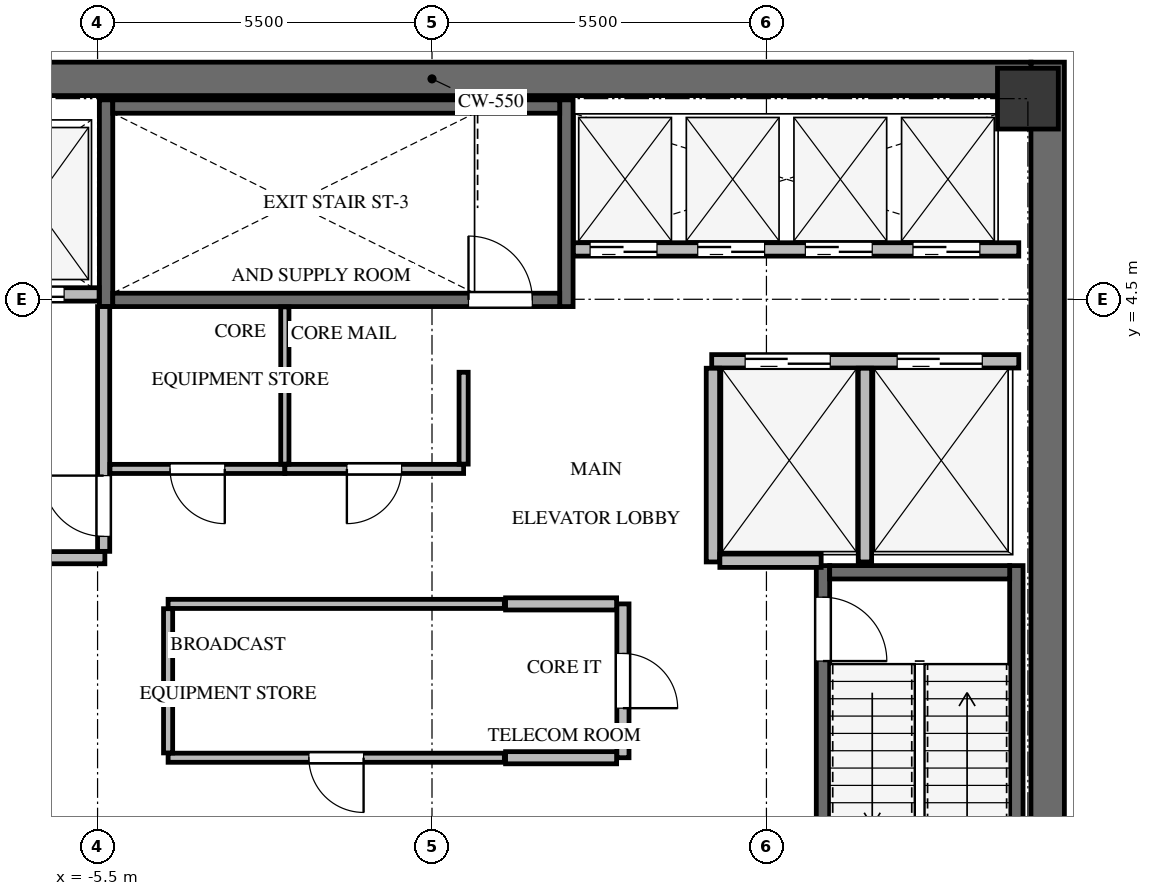
"""IFC4 building model, lengths in metres.
Left out: names, types, materials, properties, quantities, classifications, styles, units other than length and angle.
Written with IfcOpenShell. Run it as: python <this file> out.ifc"""

import sys

from ifc_helpers import new_model, si_unit, direction, frame, frame_2d, origin, origin_2d, place, context, subcontext, project, spatial, rectangle, extrude, source, transform, mapped, element, fill, save


model = new_model("IFC4")
c1 = context("Model", 3, precision=1e-05, world=origin(), true_north=direction((0.0, 1.0)))
c2 = subcontext(c1, "Body", "Model", "MODEL_VIEW")
j1 = project(units=[si_unit("LENGTHUNIT", "METRE"), si_unit("PLANEANGLEUNIT", "RADIAN")], contexts=[c1])
p1 = place(None, origin())
s1 = spatial("IfcSite", under=j1, at=p1, CompositionType="ELEMENT")
p2 = place(p1, origin())
s2 = spatial("IfcBuilding", under=s1, at=p2, CompositionType="ELEMENT")
p3 = place(p2, frame((0.0, 0.0, 268.3)))
s3 = spatial("IfcBuildingStorey", under=s2, at=p3, CompositionType="ELEMENT", Elevation=268.3)
p4 = place(p3, frame((10.125, -8.4, 0.0), z_axis=(0.0, 0.0, 1.0), x_axis=(0.0, 1.0, 0.0)))
e1 = element("IfcWall", 1, at=p4, inside=s3, PredefinedType="SHEAR", context=c2, shape_type="SweptSolid", body=[
    extrude(rectangle(XDim=16.8, YDim=0.55, at=frame_2d((8.4, 0.0))), origin(), (0.0, 0.0, 1.0), 4.2),
])
p5 = place(p3, frame((-9.85, 8.125, 0.0), z_axis=(0.0, 0.0, 1.0), x_axis=(1.0, 0.0, 0.0)))
e2 = element("IfcWall", 2, at=p5, inside=s3, PredefinedType="SHEAR", context=c2, shape_type="SweptSolid", body=[
    extrude(rectangle(XDim=19.7, YDim=0.55, at=frame_2d((9.85, 0.0))), origin(), (0.0, 0.0, 1.0), 4.2),
])
p6 = place(p3, frame((9.61, -7.77, -0.3), z_axis=(0.0, 0.0, 1.0), x_axis=(0.0, 1.0, 0.0)))
e3 = element("IfcWall", 3, at=p6, inside=s3, PredefinedType="SHEAR", context=c2, shape_type="SweptSolid", body=[
    extrude(rectangle(XDim=7.89, YDim=0.22, at=frame_2d((3.945, 0.0))), origin(), (0.0, 0.0, 1.0), 4.05),
])
p7 = place(p3, frame((6.43, 0.12, -0.3), z_axis=(0.0, 0.0, 1.0), x_axis=(0.0, -1.0, 0.0)))
e4 = element("IfcWall", 4, at=p7, inside=s3, PredefinedType="SHEAR", context=c2, shape_type="SweptSolid", body=[
    extrude(rectangle(XDim=7.89, YDim=0.22, at=frame_2d((3.945, 0.0))), origin(), (0.0, 0.0, 1.0), 4.05),
])
p8 = place(p7, frame((0.52, 0.0, 0.0)))
e5 = element("IfcOpeningElement", 5, at=p8, cuts=e4, PredefinedType="OPENING", context=c2, shape_type="SweptSolid", body=[
    extrude(rectangle(XDim=1.05, YDim=2.15, at=frame_2d((0.525, 1.075))), frame((0.0, 0.12, 0.0), z_axis=(0.0, -1.0, 0.0), x_axis=(1.0, 0.0, 0.0)), (0.0, 0.0, 1.0), 0.24),
])
p9 = place(p3, frame((9.5, 0.01, -0.3), z_axis=(0.0, 0.0, 1.0), x_axis=(-1.0, 0.0, 0.0)))
e6 = element("IfcWall", 6, at=p9, inside=s3, PredefinedType="SHEAR", context=c2, shape_type="SweptSolid", body=[
    extrude(rectangle(XDim=2.96, YDim=0.22, at=frame_2d((1.48, 0.0))), origin(), (0.0, 0.0, 1.0), 4.05),
])
for number, where, z_axis, x_axis in (
    (7, (2.21, 4.38, -0.3), (0.0, 0.0, 1.0), (0.0, 1.0, 0.0)),
    (8, (-5.36, 7.78, -0.3), (0.0, 0.0, 1.0), (0.0, -1.0, 0.0)),
):
    element("IfcWall", number, at=place(p3, frame(where, z_axis=z_axis, x_axis=x_axis)), inside=s3, PredefinedType="SHEAR", context=c2, shape_type="SweptSolid", body=[
        extrude(rectangle(XDim=3.4, YDim=0.22, at=frame_2d((1.7, 0.0))), origin(), (0.0, 0.0, 1.0), 4.05),
    ])
p10 = place(p3, frame((-5.25, 4.49, -0.3), z_axis=(0.0, 0.0, 1.0), x_axis=(1.0, 0.0, 0.0)))
e9 = element("IfcWall", 9, at=p10, inside=s3, PredefinedType="SHEAR", context=c2, shape_type="SweptSolid", body=[
    extrude(rectangle(XDim=7.35, YDim=0.22, at=frame_2d((3.675, 0.0))), origin(), (0.0, 0.0, 1.0), 4.05),
])
p11 = place(p10, frame((5.85, 0.0, 0.0)))
e10 = element("IfcOpeningElement", 10, at=p11, cuts=e9, PredefinedType="OPENING", context=c2, shape_type="SweptSolid", body=[
    extrude(rectangle(XDim=1.05, YDim=2.15, at=frame_2d((0.525, 1.075))), frame((0.0, 0.12, 0.0), z_axis=(0.0, -1.0, 0.0), x_axis=(1.0, 0.0, 0.0)), (0.0, 0.0, 1.0), 0.24),
])
p12 = place(p3, frame((2.1, 7.67, -0.3), z_axis=(0.0, 0.0, 1.0), x_axis=(-1.0, 0.0, 0.0)))
e11 = element("IfcWall", 11, at=p12, inside=s3, PredefinedType="SHEAR", context=c2, shape_type="SweptSolid", body=[
    extrude(rectangle(XDim=7.35, YDim=0.22, at=frame_2d((3.675, 0.0))), origin(), (0.0, 0.0, 1.0), 4.05),
])
m1 = source(origin(), c2, "Body", "SweptSolid", [
    extrude(rectangle(XDim=1.0, YDim=1.0, at=origin_2d()), origin(), (0.0, 0.0, 1.0), 4.05),
])
p13 = place(p3, frame((9.8, 7.8, -0.3), z_axis=(0.0, 0.0, 1.0), x_axis=(1.0, 0.0, 0.0)))
e12 = element("IfcColumn", 12, at=p13, inside=s3, PredefinedType="COLUMN", context=c2, shape_type="MappedRepresentation", body=[
    mapped(m1, transform((0.0, 0.0, 0.0), x_axis=(1.0, 0.0, 0.0), y_axis=(0.0, 1.0, 0.0), z_axis=(0.0, 0.0, 1.0), scale=1.0)),
])
p14 = place(p3, frame((-9.65, 4.58, 0.0), z_axis=(0.0, 0.0, 1.0), x_axis=(1.0, 0.0, 0.0)))
e13 = element("IfcWall", 13, at=p14, inside=s3, PredefinedType="SOLIDWALL", context=c2, shape_type="SweptSolid", body=[
    extrude(rectangle(XDim=4.175, YDim=0.22, at=frame_2d((2.087, 0.0))), origin(), (0.0, 0.0, 1.0), 3.735),
])
p15 = place(p14, frame((0.4, 0.0, 0.0)))
e14 = element("IfcOpeningElement", 14, at=p15, cuts=e13, PredefinedType="OPENING", context=c2, shape_type="SweptSolid", body=[
    extrude(rectangle(XDim=1.2, YDim=2.15, at=frame_2d((0.6, 1.075))), frame((0.0, 0.12, 0.0), z_axis=(0.0, -1.0, 0.0), x_axis=(1.0, 0.0, 0.0)), (0.0, 0.0, 1.0), 0.24),
])
p16 = place(p14, frame((2.4, 0.0, 0.0)))
e15 = element("IfcOpeningElement", 15, at=p16, cuts=e13, PredefinedType="OPENING", context=c2, shape_type="SweptSolid", body=[
    extrude(rectangle(XDim=1.2, YDim=2.15, at=frame_2d((0.6, 1.075))), frame((0.0, 0.12, 0.0), z_axis=(0.0, -1.0, 0.0), x_axis=(1.0, 0.0, 0.0)), (0.0, 0.0, 1.0), 0.24),
])
p17 = place(p3, frame((-9.65, 0.25, 0.0), z_axis=(0.0, 0.0, 1.0), x_axis=(1.0, 0.0, 0.0)))
e16 = element("IfcWall", 16, at=p17, inside=s3, PredefinedType="SOLIDWALL", context=c2, shape_type="SweptSolid", body=[
    extrude(rectangle(XDim=4.27, YDim=0.2, at=frame_2d((2.135, 0.0))), origin(), (0.0, 0.0, 1.0), 3.735),
])
p18 = place(p3, frame((-5.4, 0.354, 0.0), z_axis=(0.0, 0.0, 1.0), x_axis=(0.0, 1.0, 0.0)))
e17 = element("IfcWall", 17, at=p18, inside=s3, PredefinedType="SOLIDWALL", context=c2, shape_type="SweptSolid", body=[
    extrude(rectangle(XDim=4.026, YDim=0.2, at=frame_2d((2.013, 0.0))), origin(), (0.0, 0.0, 1.0), 3.735),
])
p19 = place(p18, frame((0.246, 0.0, 0.0)))
e18 = element("IfcOpeningElement", 18, at=p19, cuts=e17, PredefinedType="OPENING", context=c2, shape_type="SweptSolid", body=[
    extrude(rectangle(XDim=1.0, YDim=2.15, at=frame_2d((0.5, 1.075))), frame((0.0, 0.11, 0.0), z_axis=(0.0, -1.0, 0.0), x_axis=(1.0, 0.0, 0.0)), (0.0, 0.0, 1.0), 0.22),
])
p20 = place(p3, frame((4.6, 3.48, 0.0), z_axis=(0.0, 0.0, 1.0), x_axis=(1.0, 0.0, 0.0)))
e19 = element("IfcWall", 19, at=p20, inside=s3, PredefinedType="SOLIDWALL", context=c2, shape_type="SweptSolid", body=[
    extrude(rectangle(XDim=5.05, YDim=0.22, at=frame_2d((2.525, 0.0))), origin(), (0.0, 0.0, 1.0), 3.735),
])
p21 = place(p20, frame((0.55, 0.0, 0.0)))
e20 = element("IfcOpeningElement", 20, at=p21, cuts=e19, PredefinedType="OPENING", context=c2, shape_type="SweptSolid", body=[
    extrude(rectangle(XDim=1.4, YDim=2.15, at=frame_2d((0.7, 1.075))), frame((0.0, 0.12, 0.0), z_axis=(0.0, -1.0, 0.0), x_axis=(1.0, 0.0, 0.0)), (0.0, 0.0, 1.0), 0.24),
])
p22 = place(p20, frame((3.05, 0.0, 0.0)))
e21 = element("IfcOpeningElement", 21, at=p22, cuts=e19, PredefinedType="OPENING", context=c2, shape_type="SweptSolid", body=[
    extrude(rectangle(XDim=1.4, YDim=2.15, at=frame_2d((0.7, 1.075))), frame((0.0, 0.12, 0.0), z_axis=(0.0, -1.0, 0.0), x_axis=(1.0, 0.0, 0.0)), (0.0, 0.0, 1.0), 0.24),
])
for number, where, z_axis, x_axis in (
    (22, (4.62, 0.18, 0.0), (0.0, 0.0, 1.0), (0.0, 1.0, 0.0)),
    (23, (7.12, 0.18, 0.0), (0.0, 0.0, 1.0), (0.0, 1.0, 0.0)),
):
    element("IfcWall", number, at=place(p3, frame(where, z_axis=z_axis, x_axis=x_axis)), inside=s3, PredefinedType="SOLIDWALL", context=c2, shape_type="SweptSolid", body=[
        extrude(rectangle(XDim=3.186, YDim=0.22, at=frame_2d((1.593, 0.0))), origin(), (0.0, 0.0, 1.0), 3.735),
    ])
p23 = place(p3, frame((4.734, 0.2, 0.0), z_axis=(0.0, 0.0, 1.0), x_axis=(1.0, 0.0, 0.0)))
e24 = element("IfcWall", 24, at=p23, inside=s3, PredefinedType="SOLIDWALL", context=c2, shape_type="SweptSolid", body=[
    extrude(rectangle(XDim=1.666, YDim=0.22, at=frame_2d((0.833, 0.0))), origin(), (0.0, 0.0, 1.0), 3.735),
])
p24 = place(p3, frame((2.325, 5.32, 0.0), z_axis=(0.0, 0.0, 1.0), x_axis=(1.0, 0.0, 0.0)))
e25 = element("IfcWall", 25, at=p24, inside=s3, PredefinedType="SOLIDWALL", context=c2, shape_type="SweptSolid", body=[
    extrude(rectangle(XDim=7.325, YDim=0.22, at=frame_2d((3.663, 0.0))), origin(), (0.0, 0.0, 1.0), 3.735),
])
p25 = place(p24, frame((0.275, 0.0, 0.0)))
e26 = element("IfcOpeningElement", 26, at=p25, cuts=e25, PredefinedType="OPENING", context=c2, shape_type="SweptSolid", body=[
    extrude(rectangle(XDim=1.1, YDim=2.15, at=frame_2d((0.55, 1.075))), frame((0.0, 0.12, 0.0), z_axis=(0.0, -1.0, 0.0), x_axis=(1.0, 0.0, 0.0)), (0.0, 0.0, 1.0), 0.24),
])
p26 = place(p24, frame((2.045, 0.0, 0.0)))
e27 = element("IfcOpeningElement", 27, at=p26, cuts=e25, PredefinedType="OPENING", context=c2, shape_type="SweptSolid", body=[
    extrude(rectangle(XDim=1.1, YDim=2.15, at=frame_2d((0.55, 1.075))), frame((0.0, 0.12, 0.0), z_axis=(0.0, -1.0, 0.0), x_axis=(1.0, 0.0, 0.0)), (0.0, 0.0, 1.0), 0.24),
])
p27 = place(p24, frame((3.815, 0.0, 0.0)))
e28 = element("IfcOpeningElement", 28, at=p27, cuts=e25, PredefinedType="OPENING", context=c2, shape_type="SweptSolid", body=[
    extrude(rectangle(XDim=1.1, YDim=2.15, at=frame_2d((0.55, 1.075))), frame((0.0, 0.12, 0.0), z_axis=(0.0, -1.0, 0.0), x_axis=(1.0, 0.0, 0.0)), (0.0, 0.0, 1.0), 0.24),
])
p28 = place(p24, frame((5.585, 0.0, 0.0)))
e29 = element("IfcOpeningElement", 29, at=p28, cuts=e25, PredefinedType="OPENING", context=c2, shape_type="SweptSolid", body=[
    extrude(rectangle(XDim=1.1, YDim=2.15, at=frame_2d((0.55, 1.075))), frame((0.0, 0.12, 0.0), z_axis=(0.0, -1.0, 0.0), x_axis=(1.0, 0.0, 0.0)), (0.0, 0.0, 1.0), 0.24),
])
p29 = place(p3, frame((1.19, -3.04, 0.0), z_axis=(0.0, 0.0, 1.0), x_axis=(-1.0, 0.0, 0.0)))
e30 = element("IfcWall", 30, at=p29, inside=s3, PredefinedType="PARTITIONING", context=c2, shape_type="SweptSolid", body=[
    extrude(rectangle(XDim=5.53, YDim=0.15, at=frame_2d((2.765, 0.0))), origin(), (0.0, 0.0, 1.0), 3.735),
])
p30 = place(p29, frame((2.315, 0.0, 0.0)))
e31 = element("IfcOpeningElement", 31, at=p30, cuts=e30, PredefinedType="OPENING", context=c2, shape_type="SweptSolid", body=[
    extrude(rectangle(XDim=0.9, YDim=2.05, at=frame_2d((0.45, 1.025))), frame((0.0, 0.085, 0.0), z_axis=(0.0, -1.0, 0.0), x_axis=(1.0, 0.0, 0.0)), (0.0, 0.0, 1.0), 0.17),
])
p31 = place(p3, frame((-4.34, -0.51, 0.0), z_axis=(0.0, 0.0, 1.0), x_axis=(1.0, 0.0, 0.0)))
e32 = element("IfcWall", 32, at=p31, inside=s3, PredefinedType="PARTITIONING", context=c2, shape_type="SweptSolid", body=[
    extrude(rectangle(XDim=5.53, YDim=0.15, at=frame_2d((2.765, 0.0))), origin(), (0.0, 0.0, 1.0), 3.735),
])
p32 = place(p3, frame((-4.34, -2.961, 0.0), z_axis=(0.0, 0.0, 1.0), x_axis=(0.0, 1.0, 0.0)))
e33 = element("IfcWall", 33, at=p32, inside=s3, PredefinedType="PARTITIONING", context=c2, shape_type="SweptSolid", body=[
    extrude(rectangle(XDim=2.372, YDim=0.15, at=frame_2d((1.186, 0.0))), origin(), (0.0, 0.0, 1.0), 3.735),
])
p33 = place(p3, frame((3.14, -0.51, 0.0), z_axis=(0.0, 0.0, 1.0), x_axis=(0.0, -1.0, 0.0)))
e34 = element("IfcWall", 34, at=p33, inside=s3, PredefinedType="SOLIDWALL", context=c2, shape_type="SweptSolid", body=[
    extrude(rectangle(XDim=2.53, YDim=0.2, at=frame_2d((1.265, 0.0))), origin(), (0.0, 0.0, 1.0), 3.735),
])
p34 = place(p33, frame((0.815, 0.0, 0.0)))
e35 = element("IfcOpeningElement", 35, at=p34, cuts=e34, PredefinedType="OPENING", context=c2, shape_type="SweptSolid", body=[
    extrude(rectangle(XDim=0.9, YDim=2.05, at=frame_2d((0.45, 1.025))), frame((0.0, 0.11, 0.0), z_axis=(0.0, -1.0, 0.0), x_axis=(1.0, 0.0, 0.0)), (0.0, 0.0, 1.0), 0.22),
])
for number, where, z_axis, x_axis in (
    (36, (3.036, -3.04, 0.0), (0.0, 0.0, 1.0), (-1.0, 0.0, 0.0)),
    (37, (1.21, -0.51, 0.0), (0.0, 0.0, 1.0), (1.0, 0.0, 0.0)),
):
    element("IfcWall", number, at=place(p3, frame(where, z_axis=z_axis, x_axis=x_axis)), inside=s3, PredefinedType="SOLIDWALL", context=c2, shape_type="SweptSolid", body=[
        extrude(rectangle(XDim=1.826, YDim=0.2, at=frame_2d((0.913, 0.0))), origin(), (0.0, 0.0, 1.0), 3.735),
    ])
p35 = place(p3, frame((-2.42, 1.71, 0.0), z_axis=(0.0, 0.0, 1.0), x_axis=(-1.0, 0.0, 0.0)))
e38 = element("IfcWall", 38, at=p35, inside=s3, PredefinedType="PARTITIONING", context=c2, shape_type="SweptSolid", body=[
    extrude(rectangle(XDim=2.876, YDim=0.15, at=frame_2d((1.438, 0.0))), origin(), (0.0, 0.0, 1.0), 3.735),
])
p36 = place(p35, frame((0.988, 0.0, 0.0)))
e39 = element("IfcOpeningElement", 39, at=p36, cuts=e38, PredefinedType="OPENING", context=c2, shape_type="SweptSolid", body=[
    extrude(rectangle(XDim=0.9, YDim=2.05, at=frame_2d((0.45, 1.025))), frame((0.0, 0.085, 0.0), z_axis=(0.0, -1.0, 0.0), x_axis=(1.0, 0.0, 0.0)), (0.0, 0.0, 1.0), 0.17),
])
p37 = place(p3, frame((0.52, 1.71, 0.0), z_axis=(0.0, 0.0, 1.0), x_axis=(-1.0, 0.0, 0.0)))
e40 = element("IfcWall", 40, at=p37, inside=s3, PredefinedType="PARTITIONING", context=c2, shape_type="SweptSolid", body=[
    extrude(rectangle(XDim=2.94, YDim=0.15, at=frame_2d((1.47, 0.0))), origin(), (0.0, 0.0, 1.0), 3.735),
])
p38 = place(p37, frame((1.02, 0.0, 0.0)))
e41 = element("IfcOpeningElement", 41, at=p38, cuts=e40, PredefinedType="OPENING", context=c2, shape_type="SweptSolid", body=[
    extrude(rectangle(XDim=0.9, YDim=2.05, at=frame_2d((0.45, 1.025))), frame((0.0, 0.085, 0.0), z_axis=(0.0, -1.0, 0.0), x_axis=(1.0, 0.0, 0.0)), (0.0, 0.0, 1.0), 0.17),
])
p39 = place(p3, frame((0.52, 3.3, 0.0), z_axis=(0.0, 0.0, 1.0), x_axis=(0.0, -1.0, 0.0)))
e42 = element("IfcWall", 42, at=p39, inside=s3, PredefinedType="PARTITIONING", context=c2, shape_type="SweptSolid", body=[
    extrude(rectangle(XDim=1.511, YDim=0.15, at=frame_2d((0.755, 0.0))), origin(), (0.0, 0.0, 1.0), 3.735),
])
p40 = place(p3, frame((-2.42, 4.375, 0.0), z_axis=(0.0, 0.0, 1.0), x_axis=(0.0, -1.0, 0.0)))
e43 = element("IfcWall", 43, at=p40, inside=s3, PredefinedType="PARTITIONING", context=c2, shape_type="SweptSolid", body=[
    extrude(rectangle(XDim=2.586, YDim=0.135, at=frame_2d((1.293, 0.0))), origin(), (0.0, 0.0, 1.0), 3.735),
])
m2 = source(origin(), c2, "Body", "SweptSolid", [
    extrude(rectangle(XDim=1.05, YDim=2.15, at=frame_2d((0.525, 1.075))), frame((0.0, 0.025, 0.0), z_axis=(0.0, -1.0, 0.0), x_axis=(1.0, 0.0, 0.0)), (0.0, 0.0, 1.0), 0.05),
])
p41 = place(p8, origin())
e44 = element("IfcDoor", 44, at=p41, inside=s3, OperationType="SINGLE_SWING_RIGHT", PredefinedType="DOOR", context=c2, shape_type="MappedRepresentation", body=[
    mapped(m2, transform((0.0, 0.0, 0.0), x_axis=(1.0, 0.0, 0.0), y_axis=(0.0, 1.0, 0.0), z_axis=(0.0, 0.0, 1.0), scale=1.0)),
])
fill(e5, e44)
m3 = source(origin(), c2, "Body", "SweptSolid", [
    extrude(rectangle(XDim=1.05, YDim=2.15, at=frame_2d((0.525, 1.075))), frame((0.0, 0.025, 0.0), z_axis=(0.0, -1.0, 0.0), x_axis=(1.0, 0.0, 0.0)), (0.0, 0.0, 1.0), 0.05),
])
p42 = place(p11, origin())
e45 = element("IfcDoor", 45, at=p42, inside=s3, OperationType="SINGLE_SWING_LEFT", PredefinedType="DOOR", context=c2, shape_type="MappedRepresentation", body=[
    mapped(m3, transform((0.0, 0.0, 0.0), x_axis=(1.0, 0.0, 0.0), y_axis=(0.0, 1.0, 0.0), z_axis=(0.0, 0.0, 1.0), scale=1.0)),
])
fill(e10, e45)
m4 = source(origin(), c2, "Body", "SweptSolid", [
    extrude(rectangle(XDim=1.2, YDim=2.15, at=frame_2d((0.6, 1.075))), frame((0.0, 0.025, 0.0), z_axis=(0.0, -1.0, 0.0), x_axis=(1.0, 0.0, 0.0)), (0.0, 0.0, 1.0), 0.05),
])
p43 = place(p16, origin())
e46 = element("IfcDoor", 46, at=p43, inside=s3, OperationType="DOUBLE_DOOR_SLIDING", PredefinedType="DOOR", context=c2, shape_type="MappedRepresentation", body=[
    mapped(m4, transform((0.0, 0.0, 0.0), x_axis=(1.0, 0.0, 0.0), y_axis=(0.0, 1.0, 0.0), z_axis=(0.0, 0.0, 1.0), scale=1.0)),
])
fill(e15, e46)
m5 = source(origin(), c2, "Body", "SweptSolid", [
    extrude(rectangle(XDim=1.0, YDim=2.15, at=frame_2d((0.5, 1.075))), frame((0.0, 0.025, 0.0), z_axis=(0.0, -1.0, 0.0), x_axis=(1.0, 0.0, 0.0)), (0.0, 0.0, 1.0), 0.05),
])
p44 = place(p19, origin())
e47 = element("IfcDoor", 47, at=p44, inside=s3, OperationType="SINGLE_SWING_RIGHT", PredefinedType="DOOR", context=c2, shape_type="MappedRepresentation", body=[
    mapped(m5, transform((0.0, 0.0, 0.0), x_axis=(1.0, 0.0, 0.0), y_axis=(0.0, 1.0, 0.0), z_axis=(0.0, 0.0, 1.0), scale=1.0)),
])
fill(e18, e47)
m6 = source(origin(), c2, "Body", "SweptSolid", [
    extrude(rectangle(XDim=1.4, YDim=2.15, at=frame_2d((0.7, 1.075))), frame((0.0, 0.025, 0.0), z_axis=(0.0, -1.0, 0.0), x_axis=(1.0, 0.0, 0.0)), (0.0, 0.0, 1.0), 0.05),
])
p45 = place(p21, origin())
e48 = element("IfcDoor", 48, at=p45, inside=s3, OperationType="DOUBLE_DOOR_SLIDING", PredefinedType="DOOR", context=c2, shape_type="MappedRepresentation", body=[
    mapped(m6, transform((0.0, 0.0, 0.0), x_axis=(1.0, 0.0, 0.0), y_axis=(0.0, 1.0, 0.0), z_axis=(0.0, 0.0, 1.0), scale=1.0)),
])
fill(e20, e48)
p46 = place(p22, origin())
e49 = element("IfcDoor", 49, at=p46, inside=s3, OperationType="DOUBLE_DOOR_SLIDING", PredefinedType="DOOR", context=c2, shape_type="MappedRepresentation", body=[
    mapped(m6, transform((0.0, 0.0, 0.0), x_axis=(1.0, 0.0, 0.0), y_axis=(0.0, 1.0, 0.0), z_axis=(0.0, 0.0, 1.0), scale=1.0)),
])
fill(e21, e49)
m7 = source(origin(), c2, "Body", "SweptSolid", [
    extrude(rectangle(XDim=1.1, YDim=2.15, at=frame_2d((0.55, 1.075))), frame((0.0, 0.025, 0.0), z_axis=(0.0, -1.0, 0.0), x_axis=(1.0, 0.0, 0.0)), (0.0, 0.0, 1.0), 0.05),
])
p47 = place(p25, origin())
e50 = element("IfcDoor", 50, at=p47, inside=s3, OperationType="DOUBLE_DOOR_SLIDING", PredefinedType="DOOR", context=c2, shape_type="MappedRepresentation", body=[
    mapped(m7, transform((0.0, 0.0, 0.0), x_axis=(1.0, 0.0, 0.0), y_axis=(0.0, 1.0, 0.0), z_axis=(0.0, 0.0, 1.0), scale=1.0)),
])
fill(e26, e50)
p48 = place(p26, origin())
e51 = element("IfcDoor", 51, at=p48, inside=s3, OperationType="DOUBLE_DOOR_SLIDING", PredefinedType="DOOR", context=c2, shape_type="MappedRepresentation", body=[
    mapped(m7, transform((0.0, 0.0, 0.0), x_axis=(1.0, 0.0, 0.0), y_axis=(0.0, 1.0, 0.0), z_axis=(0.0, 0.0, 1.0), scale=1.0)),
])
fill(e27, e51)
p49 = place(p27, origin())
e52 = element("IfcDoor", 52, at=p49, inside=s3, OperationType="DOUBLE_DOOR_SLIDING", PredefinedType="DOOR", context=c2, shape_type="MappedRepresentation", body=[
    mapped(m7, transform((0.0, 0.0, 0.0), x_axis=(1.0, 0.0, 0.0), y_axis=(0.0, 1.0, 0.0), z_axis=(0.0, 0.0, 1.0), scale=1.0)),
])
fill(e28, e52)
p50 = place(p28, origin())
e53 = element("IfcDoor", 53, at=p50, inside=s3, OperationType="DOUBLE_DOOR_SLIDING", PredefinedType="DOOR", context=c2, shape_type="MappedRepresentation", body=[
    mapped(m7, transform((0.0, 0.0, 0.0), x_axis=(1.0, 0.0, 0.0), y_axis=(0.0, 1.0, 0.0), z_axis=(0.0, 0.0, 1.0), scale=1.0)),
])
fill(e29, e53)
m8 = source(origin(), c2, "Body", "SweptSolid", [
    extrude(rectangle(XDim=0.9, YDim=2.05, at=frame_2d((0.45, 1.025))), frame((0.0, 0.025, 0.0), z_axis=(0.0, -1.0, 0.0), x_axis=(1.0, 0.0, 0.0)), (0.0, 0.0, 1.0), 0.05),
])
p51 = place(p30, origin())
e54 = element("IfcDoor", 54, at=p51, inside=s3, OperationType="SINGLE_SWING_LEFT", PredefinedType="DOOR", context=c2, shape_type="MappedRepresentation", body=[
    mapped(m8, transform((0.0, 0.0, 0.0), x_axis=(1.0, 0.0, 0.0), y_axis=(0.0, 1.0, 0.0), z_axis=(0.0, 0.0, 1.0), scale=1.0)),
])
fill(e31, e54)
m9 = source(origin(), c2, "Body", "SweptSolid", [
    extrude(rectangle(XDim=0.9, YDim=2.05, at=frame_2d((0.45, 1.025))), frame((0.0, 0.025, 0.0), z_axis=(0.0, -1.0, 0.0), x_axis=(1.0, 0.0, 0.0)), (0.0, 0.0, 1.0), 0.05),
])
p52 = place(p34, origin())
e55 = element("IfcDoor", 55, at=p52, inside=s3, OperationType="SINGLE_SWING_RIGHT", PredefinedType="DOOR", context=c2, shape_type="MappedRepresentation", body=[
    mapped(m9, transform((0.0, 0.0, 0.0), x_axis=(1.0, 0.0, 0.0), y_axis=(0.0, 1.0, 0.0), z_axis=(0.0, 0.0, 1.0), scale=1.0)),
])
fill(e35, e55)
p53 = place(p36, origin())
e56 = element("IfcDoor", 56, at=p53, inside=s3, OperationType="SINGLE_SWING_LEFT", PredefinedType="DOOR", context=c2, shape_type="MappedRepresentation", body=[
    mapped(m8, transform((0.0, 0.0, 0.0), x_axis=(1.0, 0.0, 0.0), y_axis=(0.0, 1.0, 0.0), z_axis=(0.0, 0.0, 1.0), scale=1.0)),
])
fill(e39, e56)
p54 = place(p38, origin())
e57 = element("IfcDoor", 57, at=p54, inside=s3, OperationType="SINGLE_SWING_RIGHT", PredefinedType="DOOR", context=c2, shape_type="MappedRepresentation", body=[
    mapped(m9, transform((0.0, 0.0, 0.0), x_axis=(1.0, 0.0, 0.0), y_axis=(0.0, 1.0, 0.0), z_axis=(0.0, 0.0, 1.0), scale=1.0)),
])
fill(e41, e57)
save(model, sys.argv[1])
